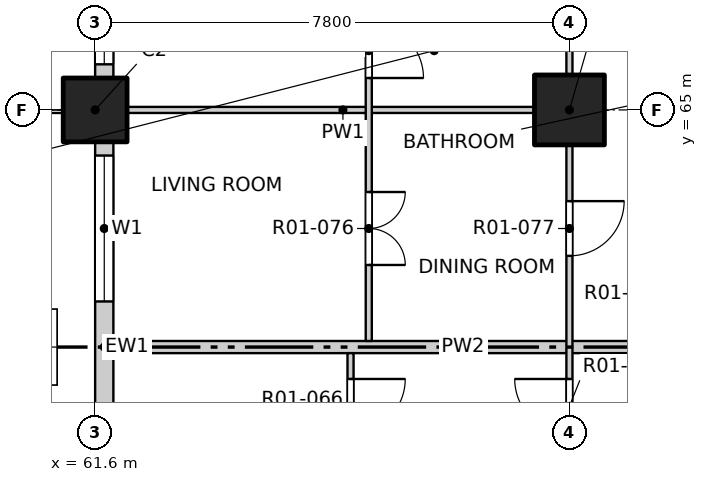
"""IFC4 building model, lengths in metres.
Left out: names, types, materials, properties, quantities, classifications, styles, units other than length and angle.
Written with IfcOpenShell. Run it as: python <this file> out.ifc"""

import sys

from ifc_helpers import new_model, si_unit, direction, frame, frame_2d, origin, origin_2d, place, context, subcontext, project, spatial, rectangle, extrude, element, fill, save


model = new_model("IFC4")
c1 = context("Model", 3, precision=1e-05, world=origin(), true_north=direction((0.0, 1.0)))
c2 = subcontext(c1, "Body", "Model", "MODEL_VIEW")
j1 = project(units=[si_unit("LENGTHUNIT", "METRE"), si_unit("PLANEANGLEUNIT", "RADIAN")], contexts=[c1])
p1 = place(None, origin())
s1 = spatial("IfcSite", under=j1, at=p1, CompositionType="ELEMENT")
p2 = place(p1, origin())
s2 = spatial("IfcBuilding", under=s1, at=p2, CompositionType="ELEMENT")
p3 = place(p2, frame((0.0, 0.0, 19.5)))
s3 = spatial("IfcBuildingStorey", under=s2, at=p3, CompositionType="ELEMENT", Elevation=19.5)
p4 = place(p3, frame((61.6, 65.0, -0.25), z_axis=(0.0, 0.0, 1.0), x_axis=(1.0, 0.0, 0.0)))
e1 = element("IfcColumn", 1, at=p4, inside=s3, PredefinedType="COLUMN", context=c2, shape_type="SweptSolid", body=[
    extrude(rectangle(XDim=1.05, YDim=1.05, at=origin_2d()), origin(), (0.0, 0.0, 1.0), 3.4),
])
p5 = place(p3, frame((69.4, 65.0, -0.25), z_axis=(0.0, 0.0, 1.0), x_axis=(1.0, 0.0, 0.0)))
e2 = element("IfcColumn", 2, at=p5, inside=s3, PredefinedType="COLUMN", context=c2, shape_type="SweptSolid", body=[
    extrude(rectangle(XDim=1.15, YDim=1.15, at=origin_2d()), origin(), (0.0, 0.0, 1.0), 3.4),
])
p6 = place(p3, frame((61.75, 57.725, 0.0), z_axis=(0.0, 0.0, 1.0), x_axis=(0.0, 1.0, 0.0)))
e3 = element("IfcWall", 3, at=p6, inside=s3, PredefinedType="SOLIDWALL", context=c2, shape_type="SweptSolid", body=[
    extrude(rectangle(XDim=6.75, YDim=0.3, at=frame_2d((3.375, 0.0))), origin(), (0.0, 0.0, 1.0), 2.7),
])
p7 = place(p6, frame((0.525, 0.0, 0.0)))
e4 = element("IfcOpeningElement", 4, at=p7, cuts=e3, PredefinedType="OPENING", context=c2, shape_type="SweptSolid", body=[
    extrude(rectangle(XDim=1.8, YDim=2.4, at=frame_2d((0.9, 1.2))), frame((0.0, 0.16, 0.0), z_axis=(0.0, -1.0, 0.0), x_axis=(1.0, 0.0, 0.0)), (0.0, 0.0, 1.0), 0.32),
])
p8 = place(p6, frame((4.125, 0.0, 0.9)))
e5 = element("IfcOpeningElement", 5, at=p8, cuts=e3, PredefinedType="OPENING", context=c2, shape_type="SweptSolid", body=[
    extrude(rectangle(XDim=2.4, YDim=1.8, at=frame_2d((1.2, 0.9))), frame((0.0, 0.16, 0.0), z_axis=(0.0, -1.0, 0.0), x_axis=(1.0, 0.0, 0.0)), (0.0, 0.0, 1.0), 0.32),
])
p9 = place(p3, frame((61.75, 65.525, 0.0), z_axis=(0.0, 0.0, 1.0), x_axis=(0.0, 1.0, 0.0)))
e6 = element("IfcWall", 6, at=p9, inside=s3, PredefinedType="SOLIDWALL", context=c2, shape_type="SweptSolid", body=[
    extrude(rectangle(XDim=6.75, YDim=0.3, at=frame_2d((3.375, 0.0))), origin(), (0.0, 0.0, 1.0), 2.7),
])
p10 = place(p9, frame((0.225, 0.0, 0.9)))
e7 = element("IfcOpeningElement", 7, at=p10, cuts=e6, PredefinedType="OPENING", context=c2, shape_type="SweptSolid", body=[
    extrude(rectangle(XDim=2.4, YDim=1.8, at=frame_2d((1.2, 0.9))), frame((0.0, 0.16, 0.0), z_axis=(0.0, -1.0, 0.0), x_axis=(1.0, 0.0, 0.0)), (0.0, 0.0, 1.0), 0.32),
])
p11 = place(p9, frame((4.125, 0.0, 0.9)))
e8 = element("IfcOpeningElement", 8, at=p11, cuts=e6, PredefinedType="OPENING", context=c2, shape_type="SweptSolid", body=[
    extrude(rectangle(XDim=2.4, YDim=1.8, at=frame_2d((1.2, 0.9))), frame((0.0, 0.16, 0.0), z_axis=(0.0, -1.0, 0.0), x_axis=(1.0, 0.0, 0.0)), (0.0, 0.0, 1.0), 0.32),
])
p12 = place(p3, frame((61.9, 61.1, 0.0), z_axis=(0.0, 0.0, 1.0), x_axis=(1.0, 0.0, 0.0)))
e9 = element("IfcWall", 9, at=p12, inside=s3, PredefinedType="PARTITIONING", context=c2, shape_type="SweptSolid", body=[
    extrude(rectangle(XDim=11.5, YDim=0.2, at=frame_2d((5.75, 0.0))), origin(), (0.0, 0.0, 1.0), 3.15),
])
p13 = place(p3, frame((61.9, 65.0, 0.0), z_axis=(0.0, 0.0, 1.0), x_axis=(1.0, 0.0, 0.0)))
e10 = element("IfcWall", 10, at=p13, inside=s3, PredefinedType="PARTITIONING", context=c2, shape_type="SweptSolid", body=[
    extrude(rectangle(XDim=7.55, YDim=0.1, at=frame_2d((3.775, 0.0))), origin(), (0.0, 0.0, 1.0), 2.55),
])
p14 = place(p3, frame((65.8, 41.9, 0.0), z_axis=(0.0, 0.0, 1.0), x_axis=(0.0, 1.0, 0.0)))
e11 = element("IfcWall", 11, at=p14, inside=s3, PredefinedType="PARTITIONING", context=c2, shape_type="SweptSolid", body=[
    extrude(rectangle(XDim=19.1, YDim=0.1, at=frame_2d((9.55, 0.0))), origin(), (0.0, 0.0, 1.0), 3.15),
])
p15 = place(p14, frame((1.05, 0.0, 0.0)))
e12 = element("IfcOpeningElement", 12, at=p15, cuts=e11, PredefinedType="OPENING", context=c2, shape_type="SweptSolid", body=[
    extrude(rectangle(XDim=1.2, YDim=2.1, at=frame_2d((0.6, 1.05))), frame((0.0, 0.06, 0.0), z_axis=(0.0, -1.0, 0.0), x_axis=(1.0, 0.0, 0.0)), (0.0, 0.0, 1.0), 0.12),
])
p16 = place(p14, frame((4.95, 0.0, 0.0)))
e13 = element("IfcOpeningElement", 13, at=p16, cuts=e11, PredefinedType="OPENING", context=c2, shape_type="SweptSolid", body=[
    extrude(rectangle(XDim=1.2, YDim=2.1, at=frame_2d((0.6, 1.05))), frame((0.0, 0.06, 0.0), z_axis=(0.0, -1.0, 0.0), x_axis=(1.0, 0.0, 0.0)), (0.0, 0.0, 1.0), 0.12),
])
p17 = place(p14, frame((8.85, 0.0, 0.0)))
e14 = element("IfcOpeningElement", 14, at=p17, cuts=e11, PredefinedType="OPENING", context=c2, shape_type="SweptSolid", body=[
    extrude(rectangle(XDim=1.2, YDim=2.1, at=frame_2d((0.6, 1.05))), frame((0.0, 0.06, 0.0), z_axis=(0.0, -1.0, 0.0), x_axis=(1.0, 0.0, 0.0)), (0.0, 0.0, 1.0), 0.12),
])
p18 = place(p14, frame((11.925, 0.0, 0.0)))
e15 = element("IfcOpeningElement", 15, at=p18, cuts=e11, PredefinedType="OPENING", context=c2, shape_type="SweptSolid", body=[
    extrude(rectangle(XDim=0.9, YDim=2.1, at=frame_2d((0.45, 1.05))), frame((0.0, 0.06, 0.0), z_axis=(0.0, -1.0, 0.0), x_axis=(1.0, 0.0, 0.0)), (0.0, 0.0, 1.0), 0.12),
])
p19 = place(p14, frame((13.875, 0.0, 0.0)))
e16 = element("IfcOpeningElement", 16, at=p19, cuts=e11, PredefinedType="OPENING", context=c2, shape_type="SweptSolid", body=[
    extrude(rectangle(XDim=0.9, YDim=2.1, at=frame_2d((0.45, 1.05))), frame((0.0, 0.06, 0.0), z_axis=(0.0, -1.0, 0.0), x_axis=(1.0, 0.0, 0.0)), (0.0, 0.0, 1.0), 0.12),
])
p20 = place(p14, frame((15.825, 0.0, 0.0)))
e17 = element("IfcOpeningElement", 17, at=p20, cuts=e11, PredefinedType="OPENING", context=c2, shape_type="SweptSolid", body=[
    extrude(rectangle(XDim=0.9, YDim=2.1, at=frame_2d((0.45, 1.05))), frame((0.0, 0.06, 0.0), z_axis=(0.0, -1.0, 0.0), x_axis=(1.0, 0.0, 0.0)), (0.0, 0.0, 1.0), 0.12),
])
p21 = place(p14, frame((17.775, 0.0, 0.0)))
e18 = element("IfcOpeningElement", 18, at=p21, cuts=e11, PredefinedType="OPENING", context=c2, shape_type="SweptSolid", body=[
    extrude(rectangle(XDim=0.9, YDim=2.1, at=frame_2d((0.45, 1.05))), frame((0.0, 0.06, 0.0), z_axis=(0.0, -1.0, 0.0), x_axis=(1.0, 0.0, 0.0)), (0.0, 0.0, 1.0), 0.12),
])
p22 = place(p3, frame((66.1, 61.2, 0.0), z_axis=(0.0, 0.0, 1.0), x_axis=(0.0, 1.0, 0.0)))
e19 = element("IfcWall", 19, at=p22, inside=s3, PredefinedType="PARTITIONING", context=c2, shape_type="SweptSolid", body=[
    extrude(rectangle(XDim=7.6, YDim=0.1, at=frame_2d((3.8, 0.0))), origin(), (0.0, 0.0, 1.0), 3.15),
])
p23 = place(p22, frame((1.25, 0.0, 0.0)))
e20 = element("IfcOpeningElement", 20, at=p23, cuts=e19, PredefinedType="OPENING", context=c2, shape_type="SweptSolid", body=[
    extrude(rectangle(XDim=1.2, YDim=2.1, at=frame_2d((0.6, 1.05))), frame((0.0, 0.06, 0.0), z_axis=(0.0, -1.0, 0.0), x_axis=(1.0, 0.0, 0.0)), (0.0, 0.0, 1.0), 0.12),
])
p24 = place(p22, frame((4.325, 0.0, 0.0)))
e21 = element("IfcOpeningElement", 21, at=p24, cuts=e19, PredefinedType="OPENING", context=c2, shape_type="SweptSolid", body=[
    extrude(rectangle(XDim=0.9, YDim=2.1, at=frame_2d((0.45, 1.05))), frame((0.0, 0.06, 0.0), z_axis=(0.0, -1.0, 0.0), x_axis=(1.0, 0.0, 0.0)), (0.0, 0.0, 1.0), 0.12),
])
p25 = place(p22, frame((6.275, 0.0, 0.0)))
e22 = element("IfcOpeningElement", 22, at=p25, cuts=e19, PredefinedType="OPENING", context=c2, shape_type="SweptSolid", body=[
    extrude(rectangle(XDim=0.9, YDim=2.1, at=frame_2d((0.45, 1.05))), frame((0.0, 0.06, 0.0), z_axis=(0.0, -1.0, 0.0), x_axis=(1.0, 0.0, 0.0)), (0.0, 0.0, 1.0), 0.12),
])
p26 = place(p3, frame((69.4, 49.4, 0.0), z_axis=(0.0, 0.0, 1.0), x_axis=(0.0, 1.0, 0.0)))
e23 = element("IfcWall", 23, at=p26, inside=s3, PredefinedType="PARTITIONING", context=c2, shape_type="SweptSolid", body=[
    extrude(rectangle(XDim=31.2, YDim=0.1, at=frame_2d((15.6, 0.0))), origin(), (0.0, 0.0, 1.0), 3.15),
])
p27 = place(p26, frame((1.5, 0.0, 0.0)))
e24 = element("IfcOpeningElement", 24, at=p27, cuts=e23, PredefinedType="OPENING", context=c2, shape_type="SweptSolid", body=[
    extrude(rectangle(XDim=0.9, YDim=2.1, at=frame_2d((0.45, 1.05))), frame((0.0, 0.06, 0.0), z_axis=(0.0, -1.0, 0.0), x_axis=(1.0, 0.0, 0.0)), (0.0, 0.0, 1.0), 0.12),
])
p28 = place(p26, frame((6.225, 0.0, 0.0)))
e25 = element("IfcOpeningElement", 25, at=p28, cuts=e23, PredefinedType="OPENING", context=c2, shape_type="SweptSolid", body=[
    extrude(rectangle(XDim=0.9, YDim=2.1, at=frame_2d((0.45, 1.05))), frame((0.0, 0.06, 0.0), z_axis=(0.0, -1.0, 0.0), x_axis=(1.0, 0.0, 0.0)), (0.0, 0.0, 1.0), 0.12),
])
p29 = place(p26, frame((10.275, 0.0, 0.0)))
e26 = element("IfcOpeningElement", 26, at=p29, cuts=e23, PredefinedType="OPENING", context=c2, shape_type="SweptSolid", body=[
    extrude(rectangle(XDim=0.9, YDim=2.1, at=frame_2d((0.45, 1.05))), frame((0.0, 0.06, 0.0), z_axis=(0.0, -1.0, 0.0), x_axis=(1.0, 0.0, 0.0)), (0.0, 0.0, 1.0), 0.12),
])
p30 = place(p26, frame((13.2, 0.0, 0.0)))
e27 = element("IfcOpeningElement", 27, at=p30, cuts=e23, PredefinedType="OPENING", context=c2, shape_type="SweptSolid", body=[
    extrude(rectangle(XDim=0.9, YDim=2.1, at=frame_2d((0.45, 1.05))), frame((0.0, 0.06, 0.0), z_axis=(0.0, -1.0, 0.0), x_axis=(1.0, 0.0, 0.0)), (0.0, 0.0, 1.0), 0.12),
])
p31 = place(p26, frame((18.075, 0.0, 0.0)))
e28 = element("IfcOpeningElement", 28, at=p31, cuts=e23, PredefinedType="OPENING", context=c2, shape_type="SweptSolid", body=[
    extrude(rectangle(XDim=0.9, YDim=2.1, at=frame_2d((0.45, 1.05))), frame((0.0, 0.06, 0.0), z_axis=(0.0, -1.0, 0.0), x_axis=(1.0, 0.0, 0.0)), (0.0, 0.0, 1.0), 0.12),
])
p32 = place(p26, frame((21.8, 0.0, 0.0)))
e29 = element("IfcOpeningElement", 29, at=p32, cuts=e23, PredefinedType="OPENING", context=c2, shape_type="SweptSolid", body=[
    extrude(rectangle(XDim=0.9, YDim=2.1, at=frame_2d((0.45, 1.05))), frame((0.0, 0.06, 0.0), z_axis=(0.0, -1.0, 0.0), x_axis=(1.0, 0.0, 0.0)), (0.0, 0.0, 1.0), 0.12),
])
p33 = place(p26, frame((24.9, 0.0, 0.0)))
e30 = element("IfcOpeningElement", 30, at=p33, cuts=e23, PredefinedType="OPENING", context=c2, shape_type="SweptSolid", body=[
    extrude(rectangle(XDim=0.9, YDim=2.1, at=frame_2d((0.45, 1.05))), frame((0.0, 0.06, 0.0), z_axis=(0.0, -1.0, 0.0), x_axis=(1.0, 0.0, 0.0)), (0.0, 0.0, 1.0), 0.12),
])
p34 = place(p26, frame((29.6, 0.0, 0.0)))
e31 = element("IfcOpeningElement", 31, at=p34, cuts=e23, PredefinedType="OPENING", context=c2, shape_type="SweptSolid", body=[
    extrude(rectangle(XDim=0.9, YDim=2.1, at=frame_2d((0.45, 1.05))), frame((0.0, 0.06, 0.0), z_axis=(0.0, -1.0, 0.0), x_axis=(1.0, 0.0, 0.0)), (0.0, 0.0, 1.0), 0.12),
])
p35 = place(p8, origin())
e32 = element("IfcWindow", 32, at=p35, inside=s3, PartitioningType="DOUBLE_PANEL_VERTICAL", PredefinedType="WINDOW", context=c2, shape_type="SweptSolid", body=[
    extrude(rectangle(XDim=2.4, YDim=1.8, at=frame_2d((1.2, 0.9))), frame((0.0, 0.03, 0.0), z_axis=(0.0, -1.0, 0.0), x_axis=(1.0, 0.0, 0.0)), (0.0, 0.0, 1.0), 0.06),
])
fill(e5, e32)
p36 = place(p10, origin())
e33 = element("IfcWindow", 33, at=p36, inside=s3, PartitioningType="DOUBLE_PANEL_VERTICAL", PredefinedType="WINDOW", context=c2, shape_type="SweptSolid", body=[
    extrude(rectangle(XDim=2.4, YDim=1.8, at=frame_2d((1.2, 0.9))), frame((0.0, 0.03, 0.0), z_axis=(0.0, -1.0, 0.0), x_axis=(1.0, 0.0, 0.0)), (0.0, 0.0, 1.0), 0.06),
])
fill(e7, e33)
p37 = place(p21, origin())
e34 = element("IfcDoor", 34, at=p37, inside=s3, OperationType="SINGLE_SWING_LEFT", PredefinedType="DOOR", context=c2, shape_type="SweptSolid", body=[
    extrude(rectangle(XDim=0.9, YDim=2.1, at=frame_2d((0.45, 1.05))), frame((0.0, 0.025, 0.0), z_axis=(0.0, -1.0, 0.0), x_axis=(1.0, 0.0, 0.0)), (0.0, 0.0, 1.0), 0.05),
])
fill(e18, e34)
p38 = place(p29, origin())
e35 = element("IfcDoor", 35, at=p38, inside=s3, OperationType="SINGLE_SWING_RIGHT", PredefinedType="DOOR", context=c2, shape_type="SweptSolid", body=[
    extrude(rectangle(XDim=0.9, YDim=2.1, at=frame_2d((0.45, 1.05))), frame((0.0, 0.025, 0.0), z_axis=(0.0, -1.0, 0.0), x_axis=(1.0, 0.0, 0.0)), (0.0, 0.0, 1.0), 0.05),
])
fill(e26, e35)
p39 = place(p23, origin())
e36 = element("IfcDoor", 36, at=p39, inside=s3, OperationType="DOUBLE_DOOR_SINGLE_SWING", PredefinedType="DOOR", context=c2, shape_type="SweptSolid", body=[
    extrude(rectangle(XDim=1.2, YDim=2.1, at=frame_2d((0.6, 1.05))), frame((0.0, 0.025, 0.0), z_axis=(0.0, -1.0, 0.0), x_axis=(1.0, 0.0, 0.0)), (0.0, 0.0, 1.0), 0.05),
])
fill(e20, e36)
p40 = place(p30, origin())
e37 = element("IfcDoor", 37, at=p40, inside=s3, OperationType="SINGLE_SWING_LEFT", PredefinedType="DOOR", context=c2, shape_type="SweptSolid", body=[
    extrude(rectangle(XDim=0.9, YDim=2.1, at=frame_2d((0.45, 1.05))), frame((0.0, 0.025, 0.0), z_axis=(0.0, -1.0, 0.0), x_axis=(1.0, 0.0, 0.0)), (0.0, 0.0, 1.0), 0.05),
])
fill(e27, e37)
p41 = place(p24, origin())
e38 = element("IfcDoor", 38, at=p41, inside=s3, OperationType="SINGLE_SWING_RIGHT", PredefinedType="DOOR", context=c2, shape_type="SweptSolid", body=[
    extrude(rectangle(XDim=0.9, YDim=2.1, at=frame_2d((0.45, 1.05))), frame((0.0, 0.025, 0.0), z_axis=(0.0, -1.0, 0.0), x_axis=(1.0, 0.0, 0.0)), (0.0, 0.0, 1.0), 0.05),
])
fill(e21, e38)
save(model, sys.argv[1])
